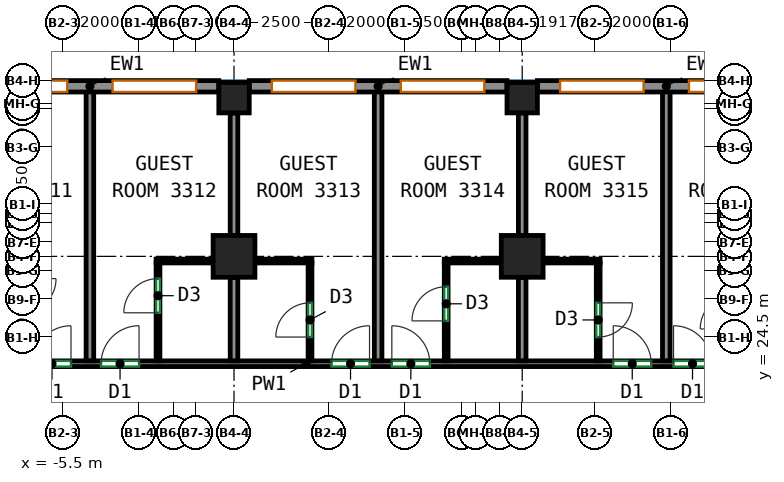
"""IFC4 building model, lengths in metres.
Left out: names, types, materials, properties, quantities, classifications, styles, units other than length and angle.
Written with IfcOpenShell. Run it as: python <this file> out.ifc"""

import sys

from ifc_helpers import new_model, si_unit, direction, frame, frame_2d, origin, origin_2d, place, context, subcontext, project, spatial, rectangle, extrude, source, transform, mapped, element, fill, save


model = new_model("IFC4")
c1 = context("Model", 3, precision=1e-05, world=origin(), true_north=direction((0.0, 1.0)))
c2 = subcontext(c1, "Body", "Model", "MODEL_VIEW")
j1 = project(units=[si_unit("LENGTHUNIT", "METRE"), si_unit("PLANEANGLEUNIT", "RADIAN")], contexts=[c1])
p1 = place(None, origin())
s1 = spatial("IfcSite", under=j1, at=p1, CompositionType="ELEMENT")
p2 = place(p1, origin())
s2 = spatial("IfcBuilding", under=s1, at=p2, CompositionType="ELEMENT")
p3 = place(p2, frame((0.0, 0.0, 147.3)))
s3 = spatial("IfcBuildingStorey", under=s2, at=p3, CompositionType="ELEMENT", Elevation=147.3)
m1 = source(origin(), c2, "Body", "SweptSolid", [
    extrude(rectangle(XDim=1.1, YDim=1.1, at=origin_2d()), origin(), (0.0, 0.0, 1.0), 3.12),
])
p4 = place(p3, frame((-1.0, 26.625, 0.0), z_axis=(0.0, 0.0, 1.0), x_axis=(1.0, 0.0, 0.0)))
e1 = element("IfcColumn", 1, at=p4, inside=s3, PredefinedType="COLUMN", context=c2, shape_type="MappedRepresentation", body=[
    mapped(m1, transform((0.0, 0.0, 0.0))),
])
m2 = source(origin(), c2, "Body", "SweptSolid", [
    extrude(rectangle(XDim=0.8, YDim=0.8, at=origin_2d()), origin(), (0.0, 0.0, 1.0), 3.12),
])
p5 = place(p3, frame((-1.0, 30.8, 0.0), z_axis=(0.0, 0.0, 1.0), x_axis=(1.0, 0.0, 0.0)))
e2 = element("IfcColumn", 2, at=p5, inside=s3, PredefinedType="COLUMN", context=c2, shape_type="MappedRepresentation", body=[
    mapped(m2, transform((0.0, 0.0, 0.0))),
])
p6 = place(p3, frame((6.583, 26.625, 0.0), z_axis=(0.0, 0.0, 1.0), x_axis=(1.0, 0.0, 0.0)))
e3 = element("IfcColumn", 3, at=p6, inside=s3, PredefinedType="COLUMN", context=c2, shape_type="MappedRepresentation", body=[
    mapped(m1, transform((0.0, 0.0, 0.0))),
])
p7 = place(p3, frame((6.583, 30.8, 0.0), z_axis=(0.0, 0.0, 1.0), x_axis=(1.0, 0.0, 0.0)))
e4 = element("IfcColumn", 4, at=p7, inside=s3, PredefinedType="COLUMN", context=c2, shape_type="MappedRepresentation", body=[
    mapped(m2, transform((0.0, 0.0, 0.0))),
])
m3 = source(origin(), c2, "Body", "SweptSolid", [
    extrude(rectangle(XDim=6.783, YDim=0.3, at=frame_2d((3.392, 0.0))), origin(), (0.0, 0.0, 1.0), 3.12),
])
p8 = place(p3, frame((13.767, 31.1, 0.0), z_axis=(0.0, 0.0, 1.0), x_axis=(-1.0, 0.0, 0.0)))
e5 = element("IfcWall", 5, at=p8, inside=s3, PredefinedType="SOLIDWALL", context=c2, shape_type="MappedRepresentation", body=[
    mapped(m3, transform((0.0, 0.0, 0.0))),
])
p9 = place(p8, frame((0.596, 0.0, 0.85)))
e6 = element("IfcOpeningElement", 6, at=p9, cuts=e5, PredefinedType="OPENING", context=c2, shape_type="SweptSolid", body=[
    extrude(rectangle(XDim=2.2, YDim=1.95, at=frame_2d((1.1, 0.975))), frame((0.0, 0.16, 0.0), z_axis=(0.0, -1.0, 0.0), x_axis=(1.0, 0.0, 0.0)), (0.0, 0.0, 1.0), 0.32),
])
p10 = place(p8, frame((3.988, 0.0, 0.85)))
e7 = element("IfcOpeningElement", 7, at=p10, cuts=e5, PredefinedType="OPENING", context=c2, shape_type="SweptSolid", body=[
    extrude(rectangle(XDim=2.2, YDim=1.95, at=frame_2d((1.1, 0.975))), frame((0.0, 0.16, 0.0), z_axis=(0.0, -1.0, 0.0), x_axis=(1.0, 0.0, 0.0)), (0.0, 0.0, 1.0), 0.32),
])
m4 = source(origin(), c2, "Body", "SweptSolid", [
    extrude(rectangle(XDim=6.783, YDim=0.3, at=frame_2d((3.392, 0.0))), origin(), (0.0, 0.0, 1.0), 3.12),
])
p11 = place(p3, frame((6.183, 31.1, 0.0), z_axis=(0.0, 0.0, 1.0), x_axis=(-1.0, 0.0, 0.0)))
e8 = element("IfcWall", 8, at=p11, inside=s3, PredefinedType="SOLIDWALL", context=c2, shape_type="MappedRepresentation", body=[
    mapped(m4, transform((0.0, 0.0, 0.0))),
])
p12 = place(p11, frame((0.596, 0.0, 0.85)))
e9 = element("IfcOpeningElement", 9, at=p12, cuts=e8, PredefinedType="OPENING", context=c2, shape_type="SweptSolid", body=[
    extrude(rectangle(XDim=2.2, YDim=1.95, at=frame_2d((1.1, 0.975))), frame((0.0, 0.16, 0.0), z_axis=(0.0, -1.0, 0.0), x_axis=(1.0, 0.0, 0.0)), (0.0, 0.0, 1.0), 0.32),
])
p13 = place(p11, frame((3.988, 0.0, 0.85)))
e10 = element("IfcOpeningElement", 10, at=p13, cuts=e8, PredefinedType="OPENING", context=c2, shape_type="SweptSolid", body=[
    extrude(rectangle(XDim=2.2, YDim=1.95, at=frame_2d((1.1, 0.975))), frame((0.0, 0.16, 0.0), z_axis=(0.0, -1.0, 0.0), x_axis=(1.0, 0.0, 0.0)), (0.0, 0.0, 1.0), 0.32),
])
p14 = place(p3, frame((-1.4, 31.1, 0.0), z_axis=(0.0, 0.0, 1.0), x_axis=(-1.0, 0.0, 0.0)))
e11 = element("IfcWall", 11, at=p14, inside=s3, PredefinedType="SOLIDWALL", context=c2, shape_type="MappedRepresentation", body=[
    mapped(m4, transform((0.0, 0.0, 0.0))),
])
p15 = place(p14, frame((0.596, 0.0, 0.85)))
e12 = element("IfcOpeningElement", 12, at=p15, cuts=e11, PredefinedType="OPENING", context=c2, shape_type="SweptSolid", body=[
    extrude(rectangle(XDim=2.2, YDim=1.95, at=frame_2d((1.1, 0.975))), frame((0.0, 0.16, 0.0), z_axis=(0.0, -1.0, 0.0), x_axis=(1.0, 0.0, 0.0)), (0.0, 0.0, 1.0), 0.32),
])
p16 = place(p14, frame((3.988, 0.0, 0.85)))
e13 = element("IfcOpeningElement", 13, at=p16, cuts=e11, PredefinedType="OPENING", context=c2, shape_type="SweptSolid", body=[
    extrude(rectangle(XDim=2.2, YDim=1.95, at=frame_2d((1.1, 0.975))), frame((0.0, 0.16, 0.0), z_axis=(0.0, -1.0, 0.0), x_axis=(1.0, 0.0, 0.0)), (0.0, 0.0, 1.0), 0.32),
])
p17 = place(p3, frame((-20.059, 23.8, 0.0), z_axis=(0.0, 0.0, 1.0), x_axis=(1.0, 0.0, 0.0)))
e14 = element("IfcWall", 14, at=p17, inside=s3, PredefinedType="PARTITIONING", context=c2, shape_type="SweptSolid", body=[
    extrude(rectangle(XDim=41.909, YDim=0.15, at=frame_2d((20.955, 0.0))), origin(), (0.0, 0.0, 1.0), 3.12),
])
p18 = place(p17, frame((0.401, 0.0, 0.0)))
e15 = element("IfcOpeningElement", 15, at=p18, cuts=e14, PredefinedType="OPENING", context=c2, shape_type="SweptSolid", body=[
    extrude(rectangle(XDim=1.0, YDim=2.1, at=frame_2d((0.5, 1.05))), frame((0.0, 0.085, 0.0), z_axis=(0.0, -1.0, 0.0), x_axis=(1.0, 0.0, 0.0)), (0.0, 0.0, 1.0), 0.17),
])
p19 = place(p17, frame((6.082, 0.0, 0.0)))
e16 = element("IfcOpeningElement", 16, at=p19, cuts=e14, PredefinedType="OPENING", context=c2, shape_type="SweptSolid", body=[
    extrude(rectangle(XDim=1.0, YDim=2.1, at=frame_2d((0.5, 1.05))), frame((0.0, 0.085, 0.0), z_axis=(0.0, -1.0, 0.0), x_axis=(1.0, 0.0, 0.0)), (0.0, 0.0, 1.0), 0.17),
])
p20 = place(p17, frame((8.08, 0.0, 0.0)))
e17 = element("IfcOpeningElement", 17, at=p20, cuts=e14, PredefinedType="OPENING", context=c2, shape_type="SweptSolid", body=[
    extrude(rectangle(XDim=1.0, YDim=2.1, at=frame_2d((0.5, 1.05))), frame((0.0, 0.085, 0.0), z_axis=(0.0, -1.0, 0.0), x_axis=(1.0, 0.0, 0.0)), (0.0, 0.0, 1.0), 0.17),
])
p21 = place(p17, frame((13.769, 0.0, 0.0)))
e18 = element("IfcOpeningElement", 18, at=p21, cuts=e14, PredefinedType="OPENING", context=c2, shape_type="SweptSolid", body=[
    extrude(rectangle(XDim=1.0, YDim=2.1, at=frame_2d((0.5, 1.05))), frame((0.0, 0.085, 0.0), z_axis=(0.0, -1.0, 0.0), x_axis=(1.0, 0.0, 0.0)), (0.0, 0.0, 1.0), 0.17),
])
p22 = place(p17, frame((15.56, 0.0, 0.0)))
e19 = element("IfcOpeningElement", 19, at=p22, cuts=e14, PredefinedType="OPENING", context=c2, shape_type="SweptSolid", body=[
    extrude(rectangle(XDim=1.0, YDim=2.1, at=frame_2d((0.5, 1.05))), frame((0.0, 0.085, 0.0), z_axis=(0.0, -1.0, 0.0), x_axis=(1.0, 0.0, 0.0)), (0.0, 0.0, 1.0), 0.17),
])
p23 = place(p17, frame((21.625, 0.0, 0.0)))
e20 = element("IfcOpeningElement", 20, at=p23, cuts=e14, PredefinedType="OPENING", context=c2, shape_type="SweptSolid", body=[
    extrude(rectangle(XDim=1.0, YDim=2.1, at=frame_2d((0.5, 1.05))), frame((0.0, 0.085, 0.0), z_axis=(0.0, -1.0, 0.0), x_axis=(1.0, 0.0, 0.0)), (0.0, 0.0, 1.0), 0.17),
])
p24 = place(p17, frame((23.212, 0.0, 0.0)))
e21 = element("IfcOpeningElement", 21, at=p24, cuts=e14, PredefinedType="OPENING", context=c2, shape_type="SweptSolid", body=[
    extrude(rectangle(XDim=1.0, YDim=2.1, at=frame_2d((0.5, 1.05))), frame((0.0, 0.085, 0.0), z_axis=(0.0, -1.0, 0.0), x_axis=(1.0, 0.0, 0.0)), (0.0, 0.0, 1.0), 0.17),
])
p25 = place(p17, frame((29.038, 0.0, 0.0)))
e22 = element("IfcOpeningElement", 22, at=p25, cuts=e14, PredefinedType="OPENING", context=c2, shape_type="SweptSolid", body=[
    extrude(rectangle(XDim=1.0, YDim=2.1, at=frame_2d((0.5, 1.05))), frame((0.0, 0.085, 0.0), z_axis=(0.0, -1.0, 0.0), x_axis=(1.0, 0.0, 0.0)), (0.0, 0.0, 1.0), 0.17),
])
p26 = place(p17, frame((30.624, 0.0, 0.0)))
e23 = element("IfcOpeningElement", 23, at=p26, cuts=e14, PredefinedType="OPENING", context=c2, shape_type="SweptSolid", body=[
    extrude(rectangle(XDim=1.0, YDim=2.1, at=frame_2d((0.5, 1.05))), frame((0.0, 0.085, 0.0), z_axis=(0.0, -1.0, 0.0), x_axis=(1.0, 0.0, 0.0)), (0.0, 0.0, 1.0), 0.17),
])
p27 = place(p17, frame((36.622, 0.0, 0.0)))
e24 = element("IfcOpeningElement", 24, at=p27, cuts=e14, PredefinedType="OPENING", context=c2, shape_type="SweptSolid", body=[
    extrude(rectangle(XDim=1.0, YDim=2.1, at=frame_2d((0.5, 1.05))), frame((0.0, 0.085, 0.0), z_axis=(0.0, -1.0, 0.0), x_axis=(1.0, 0.0, 0.0)), (0.0, 0.0, 1.0), 0.17),
])
p28 = place(p17, frame((38.516, 0.0, 0.0)))
e25 = element("IfcOpeningElement", 25, at=p28, cuts=e14, PredefinedType="OPENING", context=c2, shape_type="SweptSolid", body=[
    extrude(rectangle(XDim=1.0, YDim=2.1, at=frame_2d((0.5, 1.05))), frame((0.0, 0.085, 0.0), z_axis=(0.0, -1.0, 0.0), x_axis=(1.0, 0.0, 0.0)), (0.0, 0.0, 1.0), 0.17),
])
p29 = place(p3, frame((-4.792, 23.877, 0.0), z_axis=(0.0, 0.0, 1.0), x_axis=(0.0, 1.0, 0.0)))
e26 = element("IfcWall", 26, at=p29, inside=s3, PredefinedType="PARTITIONING", context=c2, shape_type="SweptSolid", body=[
    extrude(rectangle(XDim=7.123, YDim=0.2, at=frame_2d((3.562, 0.0))), origin(), (0.0, 0.0, 1.0), 3.12),
])
p30 = place(p3, frame((-3.05, 26.502, 0.0), z_axis=(0.0, 0.0, 1.0), x_axis=(1.0, 0.0, 0.0)))
e27 = element("IfcWall", 27, at=p30, inside=s3, PredefinedType="PARTITIONING", context=c2, shape_type="SweptSolid", body=[
    extrude(rectangle(XDim=1.5, YDim=0.1, at=frame_2d((0.75, 0.0))), origin(), (0.0, 0.0, 1.0), 3.12),
])
p31 = place(p3, frame((-3.0, 23.877, 0.0), z_axis=(0.0, 0.0, 1.0), x_axis=(0.0, 1.0, 0.0)))
e28 = element("IfcWall", 28, at=p31, inside=s3, PredefinedType="PARTITIONING", context=c2, shape_type="SweptSolid", body=[
    extrude(rectangle(XDim=2.575, YDim=0.1, at=frame_2d((1.288, 0.0))), origin(), (0.0, 0.0, 1.0), 3.12),
])
p32 = place(p31, frame((1.263, 0.0, 0.0)))
e29 = element("IfcOpeningElement", 29, at=p32, cuts=e28, PredefinedType="OPENING", context=c2, shape_type="SweptSolid", body=[
    extrude(rectangle(XDim=0.9, YDim=2.1, at=frame_2d((0.45, 1.05))), frame((0.0, 0.06, 0.0), z_axis=(0.0, -1.0, 0.0), x_axis=(1.0, 0.0, 0.0)), (0.0, 0.0, 1.0), 0.12),
])
p33 = place(p3, frame((-1.0, 27.175, 0.0), z_axis=(0.0, 0.0, 1.0), x_axis=(0.0, 1.0, 0.0)))
e30 = element("IfcWall", 30, at=p33, inside=s3, PredefinedType="PARTITIONING", context=c2, shape_type="SweptSolid", body=[
    extrude(rectangle(XDim=3.225, YDim=0.2, at=frame_2d((1.612, 0.0))), origin(), (0.0, 0.0, 1.0), 3.12),
])
p34 = place(p3, frame((-1.0, 23.877, 0.0), z_axis=(0.0, 0.0, 1.0), x_axis=(0.0, 1.0, 0.0)))
e31 = element("IfcWall", 31, at=p34, inside=s3, PredefinedType="PARTITIONING", context=c2, shape_type="SweptSolid", body=[
    extrude(rectangle(XDim=2.198, YDim=0.2, at=frame_2d((1.099, 0.0))), origin(), (0.0, 0.0, 1.0), 3.12),
])
p35 = place(p3, frame((-0.45, 26.502, 0.0), z_axis=(0.0, 0.0, 1.0), x_axis=(1.0, 0.0, 0.0)))
e32 = element("IfcWall", 32, at=p35, inside=s3, PredefinedType="PARTITIONING", context=c2, shape_type="SweptSolid", body=[
    extrude(rectangle(XDim=1.5, YDim=0.1, at=frame_2d((0.75, 0.0))), origin(), (0.0, 0.0, 1.0), 3.12),
])
p36 = place(p3, frame((1.0, 23.877, 0.0), z_axis=(0.0, 0.0, 1.0), x_axis=(0.0, 1.0, 0.0)))
e33 = element("IfcWall", 33, at=p36, inside=s3, PredefinedType="PARTITIONING", context=c2, shape_type="SweptSolid", body=[
    extrude(rectangle(XDim=2.575, YDim=0.1, at=frame_2d((1.288, 0.0))), origin(), (0.0, 0.0, 1.0), 3.12),
])
p37 = place(p36, frame((0.625, 0.0, 0.0)))
e34 = element("IfcOpeningElement", 34, at=p37, cuts=e33, PredefinedType="OPENING", context=c2, shape_type="SweptSolid", body=[
    extrude(rectangle(XDim=0.9, YDim=2.1, at=frame_2d((0.45, 1.05))), frame((0.0, 0.06, 0.0), z_axis=(0.0, -1.0, 0.0), x_axis=(1.0, 0.0, 0.0)), (0.0, 0.0, 1.0), 0.12),
])
p38 = place(p3, frame((2.792, 23.877, 0.0), z_axis=(0.0, 0.0, 1.0), x_axis=(0.0, 1.0, 0.0)))
e35 = element("IfcWall", 35, at=p38, inside=s3, PredefinedType="PARTITIONING", context=c2, shape_type="SweptSolid", body=[
    extrude(rectangle(XDim=7.123, YDim=0.2, at=frame_2d((3.562, 0.0))), origin(), (0.0, 0.0, 1.0), 3.12),
])
p39 = place(p3, frame((4.533, 26.502, 0.0), z_axis=(0.0, 0.0, 1.0), x_axis=(1.0, 0.0, 0.0)))
e36 = element("IfcWall", 36, at=p39, inside=s3, PredefinedType="PARTITIONING", context=c2, shape_type="SweptSolid", body=[
    extrude(rectangle(XDim=1.5, YDim=0.1, at=frame_2d((0.75, 0.0))), origin(), (0.0, 0.0, 1.0), 3.12),
])
p40 = place(p3, frame((4.583, 23.877, 0.0), z_axis=(0.0, 0.0, 1.0), x_axis=(0.0, 1.0, 0.0)))
e37 = element("IfcWall", 37, at=p40, inside=s3, PredefinedType="PARTITIONING", context=c2, shape_type="SweptSolid", body=[
    extrude(rectangle(XDim=2.575, YDim=0.1, at=frame_2d((1.288, 0.0))), origin(), (0.0, 0.0, 1.0), 3.12),
])
p41 = place(p40, frame((1.05, 0.0, 0.0)))
e38 = element("IfcOpeningElement", 38, at=p41, cuts=e37, PredefinedType="OPENING", context=c2, shape_type="SweptSolid", body=[
    extrude(rectangle(XDim=0.9, YDim=2.1, at=frame_2d((0.45, 1.05))), frame((0.0, 0.06, 0.0), z_axis=(0.0, -1.0, 0.0), x_axis=(1.0, 0.0, 0.0)), (0.0, 0.0, 1.0), 0.12),
])
p42 = place(p3, frame((6.583, 27.175, 0.0), z_axis=(0.0, 0.0, 1.0), x_axis=(0.0, 1.0, 0.0)))
e39 = element("IfcWall", 39, at=p42, inside=s3, PredefinedType="PARTITIONING", context=c2, shape_type="SweptSolid", body=[
    extrude(rectangle(XDim=3.225, YDim=0.2, at=frame_2d((1.612, 0.0))), origin(), (0.0, 0.0, 1.0), 3.12),
])
p43 = place(p3, frame((6.583, 23.877, 0.0), z_axis=(0.0, 0.0, 1.0), x_axis=(0.0, 1.0, 0.0)))
e40 = element("IfcWall", 40, at=p43, inside=s3, PredefinedType="PARTITIONING", context=c2, shape_type="SweptSolid", body=[
    extrude(rectangle(XDim=2.198, YDim=0.2, at=frame_2d((1.099, 0.0))), origin(), (0.0, 0.0, 1.0), 3.12),
])
p44 = place(p3, frame((7.133, 26.502, 0.0), z_axis=(0.0, 0.0, 1.0), x_axis=(1.0, 0.0, 0.0)))
e41 = element("IfcWall", 41, at=p44, inside=s3, PredefinedType="PARTITIONING", context=c2, shape_type="SweptSolid", body=[
    extrude(rectangle(XDim=1.5, YDim=0.1, at=frame_2d((0.75, 0.0))), origin(), (0.0, 0.0, 1.0), 3.12),
])
p45 = place(p3, frame((8.583, 26.452, 0.0), z_axis=(0.0, 0.0, 1.0), x_axis=(0.0, -1.0, 0.0)))
e42 = element("IfcWall", 42, at=p45, inside=s3, PredefinedType="PARTITIONING", context=c2, shape_type="SweptSolid", body=[
    extrude(rectangle(XDim=2.575, YDim=0.1, at=frame_2d((1.288, 0.0))), origin(), (0.0, 0.0, 1.0), 3.12),
])
p46 = place(p45, frame((1.05, 0.0, 0.0)))
e43 = element("IfcOpeningElement", 43, at=p46, cuts=e42, PredefinedType="OPENING", context=c2, shape_type="SweptSolid", body=[
    extrude(rectangle(XDim=0.9, YDim=2.1, at=frame_2d((0.45, 1.05))), frame((0.0, 0.06, 0.0), z_axis=(0.0, -1.0, 0.0), x_axis=(1.0, 0.0, 0.0)), (0.0, 0.0, 1.0), 0.12),
])
p47 = place(p3, frame((10.375, 23.877, 0.0), z_axis=(0.0, 0.0, 1.0), x_axis=(0.0, 1.0, 0.0)))
e44 = element("IfcWall", 44, at=p47, inside=s3, PredefinedType="PARTITIONING", context=c2, shape_type="SweptSolid", body=[
    extrude(rectangle(XDim=7.123, YDim=0.2, at=frame_2d((3.562, 0.0))), origin(), (0.0, 0.0, 1.0), 3.12),
])
p48 = place(p9, origin())
e45 = element("IfcWindow", 45, at=p48, inside=s3, PartitioningType="SINGLE_PANEL", PredefinedType="WINDOW", context=c2, shape_type="SweptSolid", body=[
    extrude(rectangle(XDim=2.2, YDim=1.95, at=frame_2d((1.1, 0.975))), frame((0.0, 0.03, 0.0), z_axis=(0.0, -1.0, 0.0), x_axis=(1.0, 0.0, 0.0)), (0.0, 0.0, 1.0), 0.06),
])
fill(e6, e45)
p49 = place(p10, origin())
e46 = element("IfcWindow", 46, at=p49, inside=s3, PartitioningType="SINGLE_PANEL", PredefinedType="WINDOW", context=c2, shape_type="SweptSolid", body=[
    extrude(rectangle(XDim=2.2, YDim=1.95, at=frame_2d((1.1, 0.975))), frame((0.0, 0.03, 0.0), z_axis=(0.0, -1.0, 0.0), x_axis=(1.0, 0.0, 0.0)), (0.0, 0.0, 1.0), 0.06),
])
fill(e7, e46)
p50 = place(p12, origin())
e47 = element("IfcWindow", 47, at=p50, inside=s3, PartitioningType="SINGLE_PANEL", PredefinedType="WINDOW", context=c2, shape_type="SweptSolid", body=[
    extrude(rectangle(XDim=2.2, YDim=1.95, at=frame_2d((1.1, 0.975))), frame((0.0, 0.03, 0.0), z_axis=(0.0, -1.0, 0.0), x_axis=(1.0, 0.0, 0.0)), (0.0, 0.0, 1.0), 0.06),
])
fill(e9, e47)
p51 = place(p13, origin())
e48 = element("IfcWindow", 48, at=p51, inside=s3, PartitioningType="SINGLE_PANEL", PredefinedType="WINDOW", context=c2, shape_type="SweptSolid", body=[
    extrude(rectangle(XDim=2.2, YDim=1.95, at=frame_2d((1.1, 0.975))), frame((0.0, 0.03, 0.0), z_axis=(0.0, -1.0, 0.0), x_axis=(1.0, 0.0, 0.0)), (0.0, 0.0, 1.0), 0.06),
])
fill(e10, e48)
p52 = place(p15, origin())
e49 = element("IfcWindow", 49, at=p52, inside=s3, PartitioningType="SINGLE_PANEL", PredefinedType="WINDOW", context=c2, shape_type="SweptSolid", body=[
    extrude(rectangle(XDim=2.2, YDim=1.95, at=frame_2d((1.1, 0.975))), frame((0.0, 0.03, 0.0), z_axis=(0.0, -1.0, 0.0), x_axis=(1.0, 0.0, 0.0)), (0.0, 0.0, 1.0), 0.06),
])
fill(e12, e49)
p53 = place(p16, origin())
e50 = element("IfcWindow", 50, at=p53, inside=s3, PartitioningType="SINGLE_PANEL", PredefinedType="WINDOW", context=c2, shape_type="SweptSolid", body=[
    extrude(rectangle(XDim=2.2, YDim=1.95, at=frame_2d((1.1, 0.975))), frame((0.0, 0.03, 0.0), z_axis=(0.0, -1.0, 0.0), x_axis=(1.0, 0.0, 0.0)), (0.0, 0.0, 1.0), 0.06),
])
fill(e13, e50)
p54 = place(p21, origin())
e51 = element("IfcDoor", 51, at=p54, inside=s3, OperationType="SINGLE_SWING_RIGHT", PredefinedType="DOOR", context=c2, shape_type="SweptSolid", body=[
    extrude(rectangle(XDim=1.0, YDim=2.1, at=frame_2d((0.5, 1.05))), frame((0.0, 0.025, 0.0), z_axis=(0.0, -1.0, 0.0), x_axis=(1.0, 0.0, 0.0)), (0.0, 0.0, 1.0), 0.05),
])
fill(e18, e51)
p55 = place(p22, origin())
e52 = element("IfcDoor", 52, at=p55, inside=s3, OperationType="SINGLE_SWING_RIGHT", PredefinedType="DOOR", context=c2, shape_type="SweptSolid", body=[
    extrude(rectangle(XDim=1.0, YDim=2.1, at=frame_2d((0.5, 1.05))), frame((0.0, 0.025, 0.0), z_axis=(0.0, -1.0, 0.0), x_axis=(1.0, 0.0, 0.0)), (0.0, 0.0, 1.0), 0.05),
])
fill(e19, e52)
p56 = place(p23, origin())
e53 = element("IfcDoor", 53, at=p56, inside=s3, OperationType="SINGLE_SWING_RIGHT", PredefinedType="DOOR", context=c2, shape_type="SweptSolid", body=[
    extrude(rectangle(XDim=1.0, YDim=2.1, at=frame_2d((0.5, 1.05))), frame((0.0, 0.025, 0.0), z_axis=(0.0, -1.0, 0.0), x_axis=(1.0, 0.0, 0.0)), (0.0, 0.0, 1.0), 0.05),
])
fill(e20, e53)
p57 = place(p24, origin())
e54 = element("IfcDoor", 54, at=p57, inside=s3, OperationType="SINGLE_SWING_LEFT", PredefinedType="DOOR", context=c2, shape_type="SweptSolid", body=[
    extrude(rectangle(XDim=1.0, YDim=2.1, at=frame_2d((0.5, 1.05))), frame((0.0, 0.025, 0.0), z_axis=(0.0, -1.0, 0.0), x_axis=(1.0, 0.0, 0.0)), (0.0, 0.0, 1.0), 0.05),
])
fill(e21, e54)
p58 = place(p25, origin())
e55 = element("IfcDoor", 55, at=p58, inside=s3, OperationType="SINGLE_SWING_LEFT", PredefinedType="DOOR", context=c2, shape_type="SweptSolid", body=[
    extrude(rectangle(XDim=1.0, YDim=2.1, at=frame_2d((0.5, 1.05))), frame((0.0, 0.025, 0.0), z_axis=(0.0, -1.0, 0.0), x_axis=(1.0, 0.0, 0.0)), (0.0, 0.0, 1.0), 0.05),
])
fill(e22, e55)
p59 = place(p26, origin())
e56 = element("IfcDoor", 56, at=p59, inside=s3, OperationType="SINGLE_SWING_LEFT", PredefinedType="DOOR", context=c2, shape_type="SweptSolid", body=[
    extrude(rectangle(XDim=1.0, YDim=2.1, at=frame_2d((0.5, 1.05))), frame((0.0, 0.025, 0.0), z_axis=(0.0, -1.0, 0.0), x_axis=(1.0, 0.0, 0.0)), (0.0, 0.0, 1.0), 0.05),
])
fill(e23, e56)
p60 = place(p37, origin())
e57 = element("IfcDoor", 57, at=p60, inside=s3, OperationType="SINGLE_SWING_LEFT", PredefinedType="DOOR", context=c2, shape_type="SweptSolid", body=[
    extrude(rectangle(XDim=0.9, YDim=2.1, at=frame_2d((0.45, 1.05))), frame((0.0, 0.025, 0.0), z_axis=(0.0, -1.0, 0.0), x_axis=(1.0, 0.0, 0.0)), (0.0, 0.0, 1.0), 0.05),
])
fill(e34, e57)
p61 = place(p46, origin())
e58 = element("IfcDoor", 58, at=p61, inside=s3, OperationType="SINGLE_SWING_LEFT", PredefinedType="DOOR", context=c2, shape_type="SweptSolid", body=[
    extrude(rectangle(XDim=0.9, YDim=2.1, at=frame_2d((0.45, 1.05))), frame((0.0, 0.025, 0.0), z_axis=(0.0, -1.0, 0.0), x_axis=(1.0, 0.0, 0.0)), (0.0, 0.0, 1.0), 0.05),
])
fill(e43, e58)
p62 = place(p41, origin())
e59 = element("IfcDoor", 59, at=p62, inside=s3, OperationType="SINGLE_SWING_LEFT", PredefinedType="DOOR", context=c2, shape_type="SweptSolid", body=[
    extrude(rectangle(XDim=0.9, YDim=2.1, at=frame_2d((0.45, 1.05))), frame((0.0, 0.025, 0.0), z_axis=(0.0, -1.0, 0.0), x_axis=(1.0, 0.0, 0.0)), (0.0, 0.0, 1.0), 0.05),
])
fill(e38, e59)
p63 = place(p32, origin())
e60 = element("IfcDoor", 60, at=p63, inside=s3, OperationType="SINGLE_SWING_LEFT", PredefinedType="DOOR", context=c2, shape_type="SweptSolid", body=[
    extrude(rectangle(XDim=0.9, YDim=2.1, at=frame_2d((0.45, 1.05))), frame((0.0, 0.025, 0.0), z_axis=(0.0, -1.0, 0.0), x_axis=(1.0, 0.0, 0.0)), (0.0, 0.0, 1.0), 0.05),
])
fill(e29, e60)
save(model, sys.argv[1])
